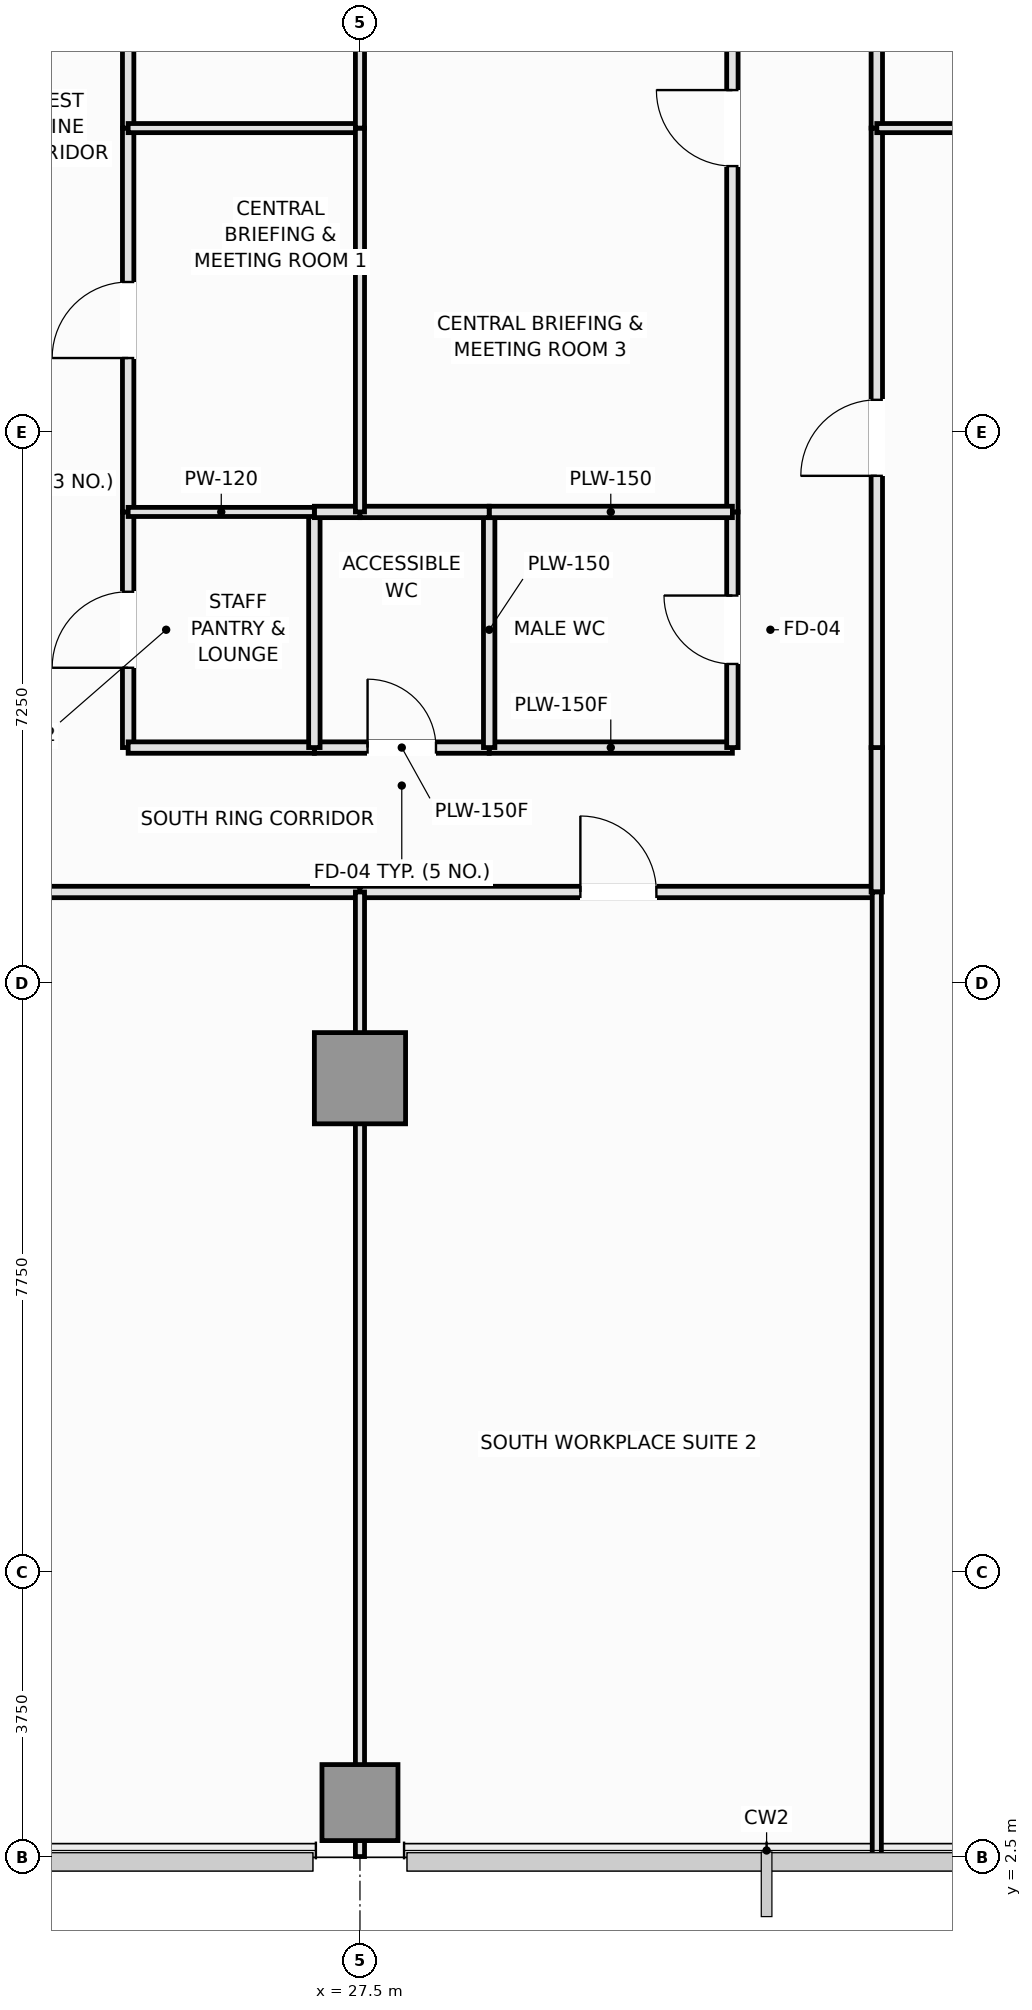
"""IFC4 building model, lengths in metres.
Left out: names, types, materials, properties, quantities, classifications, styles, units other than length and angle.
Written with IfcOpenShell. Run it as: python <this file> out.ifc"""

import sys

from ifc_helpers import new_model, si_unit, direction, frame, frame_2d, origin, origin_2d, place, context, subcontext, project, spatial, rectangle, extrude, element, fill, save


model = new_model("IFC4")
c1 = context("Model", 3, precision=1e-05, world=origin(), true_north=direction((0.0, 1.0)))
c2 = subcontext(c1, "Body", "Model", "MODEL_VIEW")
j1 = project(units=[si_unit("LENGTHUNIT", "METRE"), si_unit("PLANEANGLEUNIT", "RADIAN")], contexts=[c1])
p1 = place(None, origin())
s1 = spatial("IfcSite", under=j1, at=p1, CompositionType="ELEMENT")
p2 = place(p1, origin())
s2 = spatial("IfcBuilding", under=s1, at=p2, CompositionType="ELEMENT")
p3 = place(p2, frame((0.0, 0.0, 39.8)))
s3 = spatial("IfcBuildingStorey", under=s2, at=p3, CompositionType="ELEMENT", Elevation=39.8)
p4 = place(p3, frame((27.5, 12.75, 0.0), z_axis=(0.0, 0.0, 1.0), x_axis=(1.0, 0.0, 0.0)))
e1 = element("IfcColumn", 1, at=p4, inside=s3, PredefinedType="COLUMN", context=c2, shape_type="SweptSolid", body=[
    extrude(rectangle(XDim=1.2, YDim=1.2, at=origin_2d()), origin(), (0.0, 0.0, 1.0), 3.55),
])
p5 = place(p3, frame((27.5, 3.22, 0.0), z_axis=(0.0, 0.0, 1.0), x_axis=(1.0, 0.0, 0.0)))
e2 = element("IfcColumn", 2, at=p5, inside=s3, PredefinedType="COLUMN", context=c2, shape_type="SweptSolid", body=[
    extrude(rectangle(XDim=1.0, YDim=1.0, at=origin_2d()), origin(), (0.0, 0.0, 1.0), 3.55),
])
p6 = place(p3, frame((24.45, 17.1, 0.0), z_axis=(0.0, 0.0, 1.0), x_axis=(0.0, 1.0, 0.0)))
e3 = element("IfcWall", 3, at=p6, inside=s3, PredefinedType="PARTITIONING", context=c2, shape_type="SweptSolid", body=[
    extrude(rectangle(XDim=3.1, YDim=0.15, at=frame_2d((1.55, 0.0))), origin(), (0.0, 0.0, 1.0), 3.37),
])
p7 = place(p6, frame((1.05, 0.0, 0.0)))
e4 = element("IfcOpeningElement", 4, at=p7, cuts=e3, PredefinedType="OPENING", context=c2, shape_type="SweptSolid", body=[
    extrude(rectangle(XDim=1.0, YDim=2.15, at=frame_2d((0.5, 1.075))), frame((0.0, 0.085, 0.0), z_axis=(0.0, -1.0, 0.0), x_axis=(1.0, 0.0, 0.0)), (0.0, 0.0, 1.0), 0.17),
])
p8 = place(p3, frame((24.45, 20.2, 0.0), z_axis=(0.0, 0.0, 1.0), x_axis=(0.0, 1.0, 0.0)))
e5 = element("IfcWall", 5, at=p8, inside=s3, PredefinedType="PARTITIONING", context=c2, shape_type="SweptSolid", body=[
    extrude(rectangle(XDim=5.05, YDim=0.15, at=frame_2d((2.525, 0.0))), origin(), (0.0, 0.0, 1.0), 3.37),
])
p9 = place(p8, frame((2.025, 0.0, 0.0)))
e6 = element("IfcOpeningElement", 6, at=p9, cuts=e5, PredefinedType="OPENING", context=c2, shape_type="SweptSolid", body=[
    extrude(rectangle(XDim=1.0, YDim=2.15, at=frame_2d((0.5, 1.075))), frame((0.0, 0.085, 0.0), z_axis=(0.0, -1.0, 0.0), x_axis=(1.0, 0.0, 0.0)), (0.0, 0.0, 1.0), 0.17),
])
p10 = place(p3, frame((24.45, 25.25, 0.0), z_axis=(0.0, 0.0, 1.0), x_axis=(0.0, 1.0, 0.0)))
e7 = element("IfcWall", 7, at=p10, inside=s3, PredefinedType="PARTITIONING", context=c2, shape_type="SweptSolid", body=[
    extrude(rectangle(XDim=5.05, YDim=0.15, at=frame_2d((2.525, 0.0))), origin(), (0.0, 0.0, 1.0), 3.37),
])
p11 = place(p10, frame((2.025, 0.0, 0.0)))
e8 = element("IfcOpeningElement", 8, at=p11, cuts=e7, PredefinedType="OPENING", context=c2, shape_type="SweptSolid", body=[
    extrude(rectangle(XDim=1.0, YDim=2.15, at=frame_2d((0.5, 1.075))), frame((0.0, 0.085, 0.0), z_axis=(0.0, -1.0, 0.0), x_axis=(1.0, 0.0, 0.0)), (0.0, 0.0, 1.0), 0.17),
])
p12 = place(p3, frame((29.2, 17.1, 0.0), z_axis=(0.0, 0.0, 1.0), x_axis=(1.0, 0.0, 0.0)))
e9 = element("IfcWall", 9, at=p12, inside=s3, PredefinedType="PLUMBINGWALL", context=c2, shape_type="SweptSolid", body=[
    extrude(rectangle(XDim=3.2, YDim=0.15, at=frame_2d((1.6, 0.0))), origin(), (0.0, 0.0, 1.0), 3.37),
])
p13 = place(p3, frame((26.9, 17.1, 0.0), z_axis=(0.0, 0.0, 1.0), x_axis=(1.0, 0.0, 0.0)))
e10 = element("IfcWall", 10, at=p13, inside=s3, PredefinedType="PLUMBINGWALL", context=c2, shape_type="SweptSolid", body=[
    extrude(rectangle(XDim=2.3, YDim=0.15, at=frame_2d((1.15, 0.0))), origin(), (0.0, 0.0, 1.0), 3.37),
])
p14 = place(p13, frame((0.7, 0.0, 0.0)))
e11 = element("IfcOpeningElement", 11, at=p14, cuts=e10, PredefinedType="OPENING", context=c2, shape_type="SweptSolid", body=[
    extrude(rectangle(XDim=0.9, YDim=2.1, at=frame_2d((0.45, 1.05))), frame((0.0, 0.085, 0.0), z_axis=(0.0, -1.0, 0.0), x_axis=(1.0, 0.0, 0.0)), (0.0, 0.0, 1.0), 0.17),
])
p15 = place(p3, frame((24.45, 17.1, 0.0), z_axis=(0.0, 0.0, 1.0), x_axis=(1.0, 0.0, 0.0)))
e12 = element("IfcWall", 12, at=p15, inside=s3, PredefinedType="PARTITIONING", context=c2, shape_type="SweptSolid", body=[
    extrude(rectangle(XDim=2.45, YDim=0.15, at=frame_2d((1.225, 0.0))), origin(), (0.0, 0.0, 1.0), 3.37),
])
p16 = place(p3, frame((18.0, 15.2, 0.0), z_axis=(0.0, 0.0, 1.0), x_axis=(1.0, 0.0, 0.0)))
e13 = element("IfcWall", 13, at=p16, inside=s3, PredefinedType="PARTITIONING", context=c2, shape_type="SweptSolid", body=[
    extrude(rectangle(XDim=9.5, YDim=0.15, at=frame_2d((4.75, 0.0))), origin(), (0.0, 0.0, 1.0), 3.37),
])
p17 = place(p16, frame((4.25, 0.0, 0.0)))
e14 = element("IfcOpeningElement", 14, at=p17, cuts=e13, PredefinedType="OPENING", context=c2, shape_type="SweptSolid", body=[
    extrude(rectangle(XDim=1.0, YDim=2.15, at=frame_2d((0.5, 1.075))), frame((0.0, 0.085, 0.0), z_axis=(0.0, -1.0, 0.0), x_axis=(1.0, 0.0, 0.0)), (0.0, 0.0, 1.0), 0.17),
])
p18 = place(p3, frame((27.5, 15.2, 0.0), z_axis=(0.0, 0.0, 1.0), x_axis=(1.0, 0.0, 0.0)))
e15 = element("IfcWall", 15, at=p18, inside=s3, PredefinedType="PARTITIONING", context=c2, shape_type="SweptSolid", body=[
    extrude(rectangle(XDim=6.8, YDim=0.15, at=frame_2d((3.4, 0.0))), origin(), (0.0, 0.0, 1.0), 3.37),
])
p19 = place(p18, frame((2.9, 0.0, 0.0)))
e16 = element("IfcOpeningElement", 16, at=p19, cuts=e15, PredefinedType="OPENING", context=c2, shape_type="SweptSolid", body=[
    extrude(rectangle(XDim=1.0, YDim=2.15, at=frame_2d((0.5, 1.075))), frame((0.0, 0.085, 0.0), z_axis=(0.0, -1.0, 0.0), x_axis=(1.0, 0.0, 0.0)), (0.0, 0.0, 1.0), 0.17),
])
p20 = place(p3, frame((34.3, 15.2, 0.0), z_axis=(0.0, 0.0, 1.0), x_axis=(0.0, 1.0, 0.0)))
e17 = element("IfcWall", 17, at=p20, inside=s3, PredefinedType="PARTITIONING", context=c2, shape_type="SweptSolid", body=[
    extrude(rectangle(XDim=1.9, YDim=0.15, at=frame_2d((0.95, 0.0))), origin(), (0.0, 0.0, 1.0), 3.37),
])
p21 = place(p3, frame((32.4, 17.1, 0.0), z_axis=(0.0, 0.0, 1.0), x_axis=(0.0, 1.0, 0.0)))
e18 = element("IfcWall", 18, at=p21, inside=s3, PredefinedType="PLUMBINGWALL", context=c2, shape_type="SweptSolid", body=[
    extrude(rectangle(XDim=3.1, YDim=0.15, at=frame_2d((1.55, 0.0))), origin(), (0.0, 0.0, 1.0), 3.37),
])
p22 = place(p21, frame((1.1, 0.0, 0.0)))
e19 = element("IfcOpeningElement", 19, at=p22, cuts=e18, PredefinedType="OPENING", context=c2, shape_type="SweptSolid", body=[
    extrude(rectangle(XDim=0.9, YDim=2.1, at=frame_2d((0.45, 1.05))), frame((0.0, 0.085, 0.0), z_axis=(0.0, -1.0, 0.0), x_axis=(1.0, 0.0, 0.0)), (0.0, 0.0, 1.0), 0.17),
])
p23 = place(p3, frame((32.4, 20.2, 0.0), z_axis=(0.0, 0.0, 1.0), x_axis=(0.0, 1.0, 0.0)))
e20 = element("IfcWall", 20, at=p23, inside=s3, PredefinedType="PARTITIONING", context=c2, shape_type="SweptSolid", body=[
    extrude(rectangle(XDim=10.1, YDim=0.15, at=frame_2d((5.05, 0.0))), origin(), (0.0, 0.0, 1.0), 3.37),
])
p24 = place(p23, frame((4.55, 0.0, 0.0)))
e21 = element("IfcOpeningElement", 21, at=p24, cuts=e20, PredefinedType="OPENING", context=c2, shape_type="SweptSolid", body=[
    extrude(rectangle(XDim=1.0, YDim=2.15, at=frame_2d((0.5, 1.075))), frame((0.0, 0.085, 0.0), z_axis=(0.0, -1.0, 0.0), x_axis=(1.0, 0.0, 0.0)), (0.0, 0.0, 1.0), 0.17),
])
p25 = place(p3, frame((34.3, 17.1, 0.0), z_axis=(0.0, 0.0, 1.0), x_axis=(0.0, 1.0, 0.0)))
e22 = element("IfcWall", 22, at=p25, inside=s3, PredefinedType="PARTITIONING", context=c2, shape_type="SweptSolid", body=[
    extrude(rectangle(XDim=8.15, YDim=0.15, at=frame_2d((4.075, 0.0))), origin(), (0.0, 0.0, 1.0), 3.37),
])
p26 = place(p25, frame((3.575, 0.0, 0.0)))
e23 = element("IfcOpeningElement", 23, at=p26, cuts=e22, PredefinedType="OPENING", context=c2, shape_type="SweptSolid", body=[
    extrude(rectangle(XDim=1.0, YDim=2.15, at=frame_2d((0.5, 1.075))), frame((0.0, 0.085, 0.0), z_axis=(0.0, -1.0, 0.0), x_axis=(1.0, 0.0, 0.0)), (0.0, 0.0, 1.0), 0.17),
])
p27 = place(p3, frame((34.3, 25.25, 0.0), z_axis=(0.0, 0.0, 1.0), x_axis=(0.0, 1.0, 0.0)))
e24 = element("IfcWall", 24, at=p27, inside=s3, PredefinedType="PARTITIONING", context=c2, shape_type="SweptSolid", body=[
    extrude(rectangle(XDim=8.15, YDim=0.15, at=frame_2d((4.075, 0.0))), origin(), (0.0, 0.0, 1.0), 3.37),
])
p28 = place(p27, frame((3.575, 0.0, 0.0)))
e25 = element("IfcOpeningElement", 25, at=p28, cuts=e24, PredefinedType="OPENING", context=c2, shape_type="SweptSolid", body=[
    extrude(rectangle(XDim=1.0, YDim=2.15, at=frame_2d((0.5, 1.075))), frame((0.0, 0.085, 0.0), z_axis=(0.0, -1.0, 0.0), x_axis=(1.0, 0.0, 0.0)), (0.0, 0.0, 1.0), 0.17),
])
p29 = place(p3, frame((29.2, 17.1, 0.0), z_axis=(0.0, 0.0, 1.0), x_axis=(0.0, 1.0, 0.0)))
e26 = element("IfcWall", 26, at=p29, inside=s3, PredefinedType="PLUMBINGWALL", context=c2, shape_type="SweptSolid", body=[
    extrude(rectangle(XDim=3.1, YDim=0.15, at=frame_2d((1.55, 0.0))), origin(), (0.0, 0.0, 1.0), 3.37),
])
p30 = place(p3, frame((29.2, 20.2, 0.0), z_axis=(0.0, 0.0, 1.0), x_axis=(1.0, 0.0, 0.0)))
e27 = element("IfcWall", 27, at=p30, inside=s3, PredefinedType="PLUMBINGWALL", context=c2, shape_type="SweptSolid", body=[
    extrude(rectangle(XDim=3.2, YDim=0.15, at=frame_2d((1.6, 0.0))), origin(), (0.0, 0.0, 1.0), 3.37),
])
p31 = place(p3, frame((26.9, 17.1, 0.0), z_axis=(0.0, 0.0, 1.0), x_axis=(0.0, 1.0, 0.0)))
e28 = element("IfcWall", 28, at=p31, inside=s3, PredefinedType="PLUMBINGWALL", context=c2, shape_type="SweptSolid", body=[
    extrude(rectangle(XDim=3.1, YDim=0.15, at=frame_2d((1.55, 0.0))), origin(), (0.0, 0.0, 1.0), 3.37),
])
p32 = place(p3, frame((26.9, 20.2, 0.0), z_axis=(0.0, 0.0, 1.0), x_axis=(1.0, 0.0, 0.0)))
e29 = element("IfcWall", 29, at=p32, inside=s3, PredefinedType="PLUMBINGWALL", context=c2, shape_type="SweptSolid", body=[
    extrude(rectangle(XDim=0.6, YDim=0.15, at=frame_2d((0.3, 0.0))), origin(), (0.0, 0.0, 1.0), 3.37),
])
p33 = place(p3, frame((27.5, 20.2, 0.0), z_axis=(0.0, 0.0, 1.0), x_axis=(1.0, 0.0, 0.0)))
e30 = element("IfcWall", 30, at=p33, inside=s3, PredefinedType="PLUMBINGWALL", context=c2, shape_type="SweptSolid", body=[
    extrude(rectangle(XDim=1.7, YDim=0.15, at=frame_2d((0.85, 0.0))), origin(), (0.0, 0.0, 1.0), 3.37),
])
p34 = place(p3, frame((24.45, 20.2, 0.0), z_axis=(0.0, 0.0, 1.0), x_axis=(1.0, 0.0, 0.0)))
e31 = element("IfcWall", 31, at=p34, inside=s3, PredefinedType="PARTITIONING", context=c2, shape_type="SweptSolid", body=[
    extrude(rectangle(XDim=2.45, YDim=0.12, at=frame_2d((1.225, 0.0))), origin(), (0.0, 0.0, 1.0), 3.37),
])
p35 = place(p3, frame((24.45, 25.25, 0.0), z_axis=(0.0, 0.0, 1.0), x_axis=(1.0, 0.0, 0.0)))
e32 = element("IfcWall", 32, at=p35, inside=s3, PredefinedType="PARTITIONING", context=c2, shape_type="SweptSolid", body=[
    extrude(rectangle(XDim=3.05, YDim=0.12, at=frame_2d((1.525, 0.0))), origin(), (0.0, 0.0, 1.0), 2.72),
])
for number, where, z_axis, x_axis in (
    (33, (27.5, 20.2, 0.0), (0.0, 0.0, 1.0), (0.0, 1.0, 0.0)),
    (34, (27.5, 25.25, 0.0), (0.0, 0.0, 1.0), (0.0, 1.0, 0.0)),
):
    element("IfcWall", number, at=place(p3, frame(where, z_axis=z_axis, x_axis=x_axis)), inside=s3, PredefinedType="PARTITIONING", context=c2, shape_type="SweptSolid", body=[
        extrude(rectangle(XDim=5.05, YDim=0.12, at=frame_2d((2.525, 0.0))), origin(), (0.0, 0.0, 1.0), 3.37),
    ])
p36 = place(p3, frame((27.5, 2.51, 0.0), z_axis=(0.0, 0.0, 1.0), x_axis=(0.0, 1.0, 0.0)))
e35 = element("IfcWall", 35, at=p36, inside=s3, PredefinedType="PARTITIONING", context=c2, shape_type="SweptSolid", body=[
    extrude(rectangle(XDim=12.69, YDim=0.12, at=frame_2d((6.345, 0.0))), origin(), (0.0, 0.0, 1.0), 2.82),
])
p37 = place(p3, frame((34.3, 2.51, 0.0), z_axis=(0.0, 0.0, 1.0), x_axis=(0.0, 1.0, 0.0)))
e36 = element("IfcWall", 36, at=p37, inside=s3, PredefinedType="PARTITIONING", context=c2, shape_type="SweptSolid", body=[
    extrude(rectangle(XDim=12.69, YDim=0.12, at=frame_2d((6.345, 0.0))), origin(), (0.0, 0.0, 1.0), 3.37),
])
p38 = place(p3, frame((34.3, 25.25, 0.0), z_axis=(0.0, 0.0, 1.0), x_axis=(1.0, 0.0, 0.0)))
e37 = element("IfcWall", 37, at=p38, inside=s3, PredefinedType="PARTITIONING", context=c2, shape_type="SweptSolid", body=[
    extrude(rectangle(XDim=19.19, YDim=0.12, at=frame_2d((9.595, 0.0))), origin(), (0.0, 0.0, 1.0), 2.72),
])
p39 = place(p7, origin())
e38 = element("IfcDoor", 38, at=p39, inside=s3, OperationType="SINGLE_SWING_LEFT", PredefinedType="DOOR", context=c2, shape_type="SweptSolid", body=[
    extrude(rectangle(XDim=1.0, YDim=2.15, at=frame_2d((0.5, 1.075))), frame((0.0, 0.025, 0.0), z_axis=(0.0, -1.0, 0.0), x_axis=(1.0, 0.0, 0.0)), (0.0, 0.0, 1.0), 0.05),
])
fill(e4, e38)
p40 = place(p9, origin())
e39 = element("IfcDoor", 39, at=p40, inside=s3, OperationType="SINGLE_SWING_LEFT", PredefinedType="DOOR", context=c2, shape_type="SweptSolid", body=[
    extrude(rectangle(XDim=1.0, YDim=2.15, at=frame_2d((0.5, 1.075))), frame((0.0, 0.025, 0.0), z_axis=(0.0, -1.0, 0.0), x_axis=(1.0, 0.0, 0.0)), (0.0, 0.0, 1.0), 0.05),
])
fill(e6, e39)
p41 = place(p14, origin())
e40 = element("IfcDoor", 40, at=p41, inside=s3, OperationType="SINGLE_SWING_LEFT", PredefinedType="DOOR", context=c2, shape_type="SweptSolid", body=[
    extrude(rectangle(XDim=0.9, YDim=2.1, at=frame_2d((0.45, 1.05))), frame((0.0, 0.025, 0.0), z_axis=(0.0, -1.0, 0.0), x_axis=(1.0, 0.0, 0.0)), (0.0, 0.0, 1.0), 0.05),
])
fill(e11, e40)
p42 = place(p19, origin())
e41 = element("IfcDoor", 41, at=p42, inside=s3, OperationType="SINGLE_SWING_LEFT", PredefinedType="DOOR", context=c2, shape_type="SweptSolid", body=[
    extrude(rectangle(XDim=1.0, YDim=2.15, at=frame_2d((0.5, 1.075))), frame((0.0, 0.025, 0.0), z_axis=(0.0, -1.0, 0.0), x_axis=(1.0, 0.0, 0.0)), (0.0, 0.0, 1.0), 0.05),
])
fill(e16, e41)
p43 = place(p22, origin())
e42 = element("IfcDoor", 42, at=p43, inside=s3, OperationType="SINGLE_SWING_RIGHT", PredefinedType="DOOR", context=c2, shape_type="SweptSolid", body=[
    extrude(rectangle(XDim=0.9, YDim=2.1, at=frame_2d((0.45, 1.05))), frame((0.0, 0.025, 0.0), z_axis=(0.0, -1.0, 0.0), x_axis=(1.0, 0.0, 0.0)), (0.0, 0.0, 1.0), 0.05),
])
fill(e19, e42)
p44 = place(p24, origin())
e43 = element("IfcDoor", 43, at=p44, inside=s3, OperationType="SINGLE_SWING_RIGHT", PredefinedType="DOOR", context=c2, shape_type="SweptSolid", body=[
    extrude(rectangle(XDim=1.0, YDim=2.15, at=frame_2d((0.5, 1.075))), frame((0.0, 0.025, 0.0), z_axis=(0.0, -1.0, 0.0), x_axis=(1.0, 0.0, 0.0)), (0.0, 0.0, 1.0), 0.05),
])
fill(e21, e43)
p45 = place(p26, origin())
e44 = element("IfcDoor", 44, at=p45, inside=s3, OperationType="SINGLE_SWING_LEFT", PredefinedType="DOOR", context=c2, shape_type="SweptSolid", body=[
    extrude(rectangle(XDim=1.0, YDim=2.15, at=frame_2d((0.5, 1.075))), frame((0.0, 0.025, 0.0), z_axis=(0.0, -1.0, 0.0), x_axis=(1.0, 0.0, 0.0)), (0.0, 0.0, 1.0), 0.05),
])
fill(e23, e44)
save(model, sys.argv[1])
